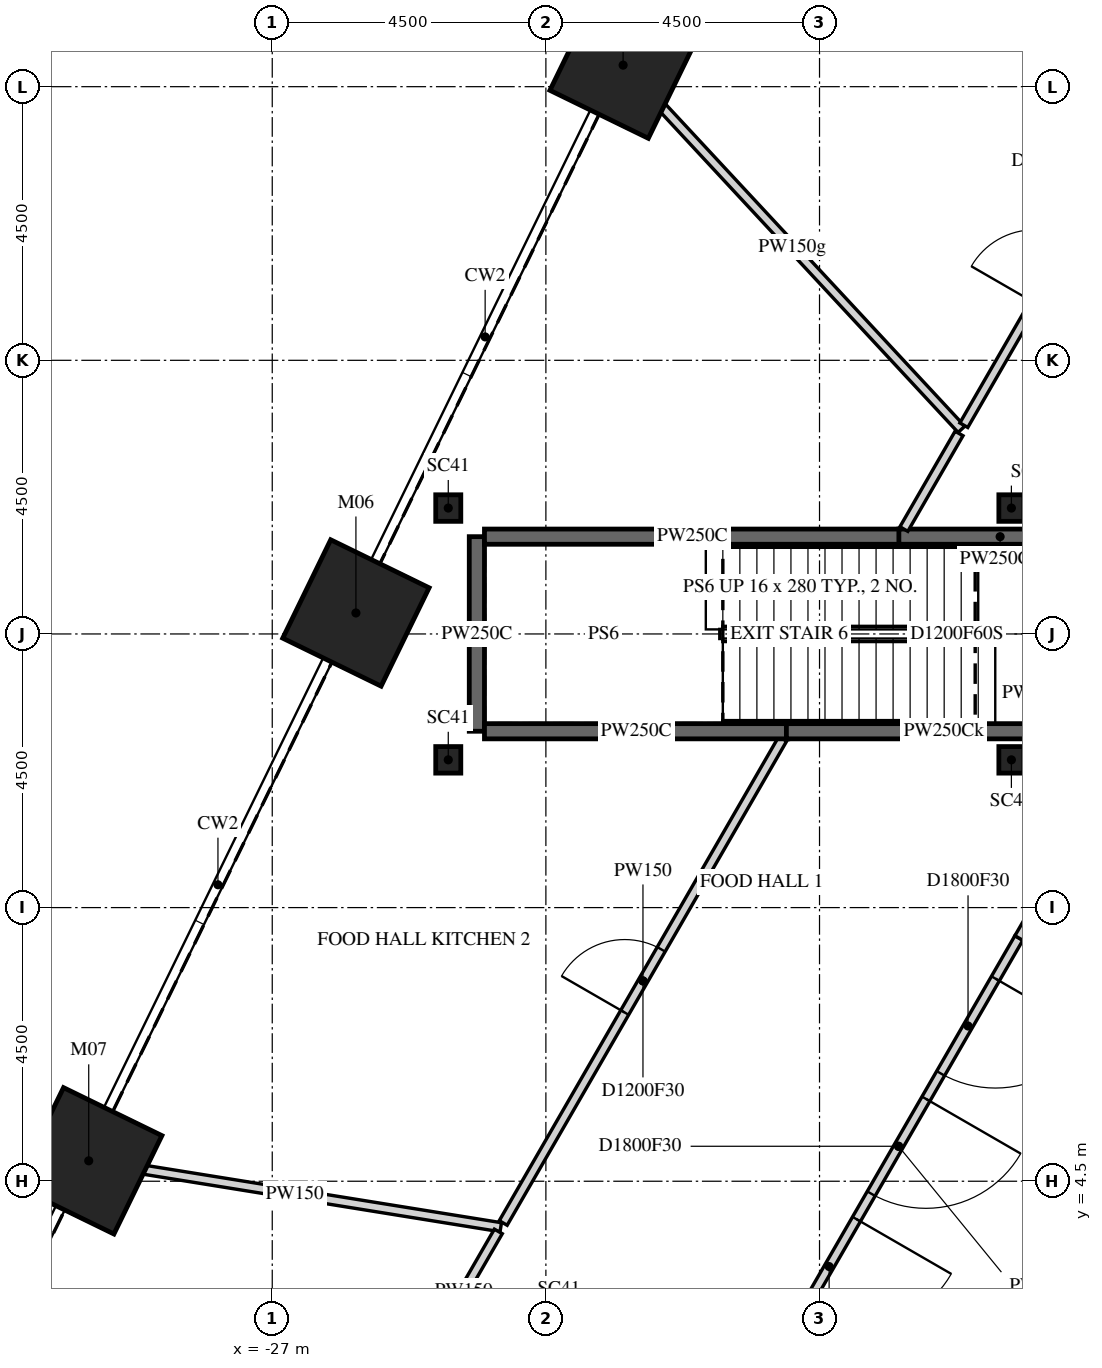
"""IFC4 building model, lengths in metres.
Left out: names, types, materials, properties, quantities, classifications, styles, units other than length and angle.
Written with IfcOpenShell. Run it as: python <this file> out.ifc"""

import sys

from ifc_helpers import new_model, si_unit, direction, frame, frame_2d, origin, origin_2d, place, context, subcontext, project, spatial, polyline, rectangle, i_section, outline, extrude, element, fill, save


model = new_model("IFC4")
c1 = context("Model", 3, precision=1e-05, world=origin(), true_north=direction((0.0, 1.0)))
c2 = subcontext(c1, "Body", "Model", "MODEL_VIEW")
j1 = project(units=[si_unit("LENGTHUNIT", "METRE"), si_unit("PLANEANGLEUNIT", "RADIAN")], contexts=[c1])
p1 = place(None, origin())
s1 = spatial("IfcSite", under=j1, at=p1, CompositionType="ELEMENT")
p2 = place(p1, origin())
s2 = spatial("IfcBuilding", under=s1, at=p2, CompositionType="ELEMENT")
p3 = place(p2, frame((0.0, 0.0, 20.5)))
s3 = spatial("IfcBuildingStorey", under=s2, at=p3, CompositionType="ELEMENT", Elevation=20.5)
for number, where, z_axis, x_axis in (
    (1, (-21.23, 22.854, -0.25), (0.0, 0.0, 1.0), (0.438, 0.899, 0.0)),
    (2, (-25.624, 13.845, -0.25), (0.0, 0.0, 1.0), (0.438, 0.899, 0.0)),
    (3, (-30.018, 4.836, -0.25), (0.0, 0.0, 1.0), (0.438, 0.899, 0.0)),
):
    element("IfcColumn", number, at=place(p3, frame(where, z_axis=z_axis, x_axis=x_axis)), inside=s3, PredefinedType="COLUMN", context=c2, shape_type="SweptSolid", body=[
        extrude(rectangle(XDim=1.8, YDim=1.8, at=origin_2d()), origin(), (0.0, 0.0, 1.0), 5.5),
    ])
for number, where, z_axis, x_axis in (
    (4, (-24.105, 11.43, -0.25), (0.0, 0.0, 1.0), (1.0, 0.0, 0.0)),
    (5, (-24.105, 15.57, -0.25), (0.0, 0.0, 1.0), (1.0, 0.0, 0.0)),
    (6, (-14.845, 15.57, -0.25), (0.0, 0.0, 1.0), (1.0, 0.0, 0.0)),
    (7, (-14.845, 11.43, -0.25), (0.0, 0.0, 1.0), (1.0, 0.0, 0.0)),
):
    element("IfcColumn", number, at=place(p3, frame(where, z_axis=z_axis, x_axis=x_axis)), inside=s3, PredefinedType="COLUMN", context=c2, shape_type="SweptSolid", body=[
        extrude(i_section(OverallWidth=0.412, OverallDepth=0.437, WebThickness=0.036, FlangeThickness=0.058, FilletRadius=0.015, at=origin_2d()), origin(), (0.0, 0.0, 1.0), 5.5),
    ])
p4 = place(p3, frame((-7.91, 13.7, -0.25), z_axis=(0.0, 0.0, 1.0), x_axis=(-0.499999880136, -0.866025472988, 0.0)))
e8 = element("IfcWall", 8, at=p4, inside=s3, PredefinedType="SHEAR", context=c2, shape_type="SweptSolid", body=[
    extrude(outline(polyline([(-0.173, -0.3), (15.993, -0.3), (15.646, 0.3), (0.173, 0.3), (-0.173, -0.3)])), origin(), (0.0, 0.0, 1.0), 5.5),
])
p5 = place(p4, frame((7.039, 0.0, 0.25)))
e9 = element("IfcOpeningElement", 9, at=p5, cuts=e8, PredefinedType="OPENING", context=c2, shape_type="SweptSolid", body=[
    extrude(rectangle(XDim=1.8, YDim=2.4, at=frame_2d((0.9, 1.2))), frame((0.0, 0.31, 0.0), z_axis=(0.0, -1.0, 0.0), x_axis=(1.0, 0.0, 0.0)), (0.0, 0.0, 1.0), 0.62),
])
p6 = place(p3, frame((-30.018, 4.836, 0.0), z_axis=(0.0, 0.0, 1.0), x_axis=(0.987261315122, -0.159107182941, 0.0)))
e10 = element("IfcWall", 10, at=p6, inside=s3, PredefinedType="PARTITIONING", context=c2, shape_type="SweptSolid", body=[
    extrude(rectangle(XDim=6.864, YDim=0.15, at=frame_2d((3.432, 0.0))), origin(), (0.0, 0.0, 1.0), 5.25),
])
p7 = place(p3, frame((-23.635, 11.9, 0.0), z_axis=(0.0, 0.0, 1.0), x_axis=(0.0, 1.0, 0.0)))
e11 = element("IfcWall", 11, at=p7, inside=s3, PredefinedType="PARTITIONING", context=c2, shape_type="SweptSolid", body=[
    extrude(rectangle(XDim=3.2, YDim=0.25, at=frame_2d((1.6, 0.0))), origin(), (0.0, 0.0, 1.0), 5.25),
])
p8 = place(p3, frame((-23.51, 15.1, 0.0), z_axis=(0.0, 0.0, 1.0), x_axis=(1.0, 0.0, 0.0)))
e12 = element("IfcWall", 12, at=p8, inside=s3, PredefinedType="PARTITIONING", context=c2, shape_type="SweptSolid", body=[
    extrude(rectangle(XDim=6.837, YDim=0.25, at=frame_2d((3.418, 0.0))), origin(), (0.0, 0.0, 1.0), 5.25),
])
p9 = place(p3, frame((-23.282, 3.675, 0.0), z_axis=(0.0, 0.0, 1.0), x_axis=(-0.49987077196, -0.866100000774, 0.0)))
e13 = element("IfcWall", 13, at=p9, inside=s3, PredefinedType="PARTITIONING", context=c2, shape_type="SweptSolid", body=[
    extrude(rectangle(XDim=2.28, YDim=0.15, at=frame_2d((1.14, 0.0))), origin(), (0.0, 0.0, 1.0), 5.25),
])
p10 = place(p3, frame((-21.23, 22.854, 0.0), z_axis=(0.0, 0.0, 1.0), x_axis=(0.680630925451, -0.732626469164, 0.0)))
e14 = element("IfcWall", 14, at=p10, inside=s3, PredefinedType="PARTITIONING", context=c2, shape_type="SweptSolid", body=[
    extrude(rectangle(XDim=8.175, YDim=0.15, at=frame_2d((4.087, 0.0))), origin(), (0.0, 0.0, 1.0), 4.488),
])
p11 = place(p3, frame((-23.202, 3.813, 0.0), z_axis=(0.0, 0.0, 1.0), x_axis=(0.500012104326, 0.866018415236, 0.0)))
e15 = element("IfcWall", 15, at=p11, inside=s3, PredefinedType="PARTITIONING", context=c2, shape_type="SweptSolid", body=[
    extrude(rectangle(XDim=9.193, YDim=0.15, at=frame_2d((4.597, 0.0))), origin(), (0.0, 0.0, 1.0), 5.25),
])
p12 = place(p11, frame((3.997, 0.0, 0.0)))
e16 = element("IfcOpeningElement", 16, at=p12, cuts=e15, PredefinedType="OPENING", context=c2, shape_type="SweptSolid", body=[
    extrude(rectangle(XDim=1.2, YDim=2.1, at=frame_2d((0.6, 1.05))), frame((0.0, 0.085, 0.0), z_axis=(0.0, -1.0, 0.0), x_axis=(1.0, 0.0, 0.0)), (0.0, 0.0, 1.0), 0.17),
])
p13 = place(p3, frame((-18.523, 11.9, 0.0), z_axis=(0.0, 0.0, 1.0), x_axis=(-1.0, 0.0, 0.0)))
e17 = element("IfcWall", 17, at=p13, inside=s3, PredefinedType="PARTITIONING", context=c2, shape_type="SweptSolid", body=[
    extrude(rectangle(XDim=4.987, YDim=0.25, at=frame_2d((2.494, 0.0))), origin(), (0.0, 0.0, 1.0), 5.25),
])
p14 = place(p3, frame((-16.695, 15.1, 0.0), z_axis=(0.0, 0.0, 1.0), x_axis=(1.0, 0.0, 0.0)))
e18 = element("IfcWall", 18, at=p14, inside=s3, PredefinedType="PARTITIONING", context=c2, shape_type="SweptSolid", body=[
    extrude(rectangle(XDim=3.33, YDim=0.25, at=frame_2d((1.665, 0.0))), origin(), (0.0, 0.0, 1.0), 4.488),
])
p15 = place(p3, frame((-15.705, 16.797, 0.0), z_axis=(0.0, 0.0, 1.0), x_axis=(-0.499943671218, -0.86605792278, 0.0)))
e19 = element("IfcWall", 19, at=p15, inside=s3, PredefinedType="PARTITIONING", context=c2, shape_type="SweptSolid", body=[
    extrude(rectangle(XDim=1.815, YDim=0.15, at=frame_2d((0.908, 0.0))), origin(), (0.0, 0.0, 1.0), 5.25),
])
p16 = place(p3, frame((-14.722, 8.5, 0.0), z_axis=(0.0, 0.0, 1.0), x_axis=(-0.500085786821, -0.865975869075, 0.0)))
e20 = element("IfcWall", 20, at=p16, inside=s3, PredefinedType="PARTITIONING", context=c2, shape_type="SweptSolid", body=[
    extrude(rectangle(XDim=7.91, YDim=0.15, at=frame_2d((3.955, 0.0))), origin(), (0.0, 0.0, 1.0), 5.25),
])
p17 = place(p16, frame((0.771, 0.0, 0.0)))
e21 = element("IfcOpeningElement", 21, at=p17, cuts=e20, PredefinedType="OPENING", context=c2, shape_type="SweptSolid", body=[
    extrude(rectangle(XDim=1.8, YDim=2.1, at=frame_2d((0.9, 1.05))), frame((0.0, 0.085, 0.0), z_axis=(0.0, -1.0, 0.0), x_axis=(1.0, 0.0, 0.0)), (0.0, 0.0, 1.0), 0.17),
])
p18 = place(p16, frame((3.055, 0.0, 0.0)))
e22 = element("IfcOpeningElement", 22, at=p18, cuts=e20, PredefinedType="OPENING", context=c2, shape_type="SweptSolid", body=[
    extrude(rectangle(XDim=1.8, YDim=2.1, at=frame_2d((0.9, 1.05))), frame((0.0, 0.085, 0.0), z_axis=(0.0, -1.0, 0.0), x_axis=(1.0, 0.0, 0.0)), (0.0, 0.0, 1.0), 0.17),
])
p19 = place(p16, frame((5.339, 0.0, 0.0)))
e23 = element("IfcOpeningElement", 23, at=p19, cuts=e20, PredefinedType="OPENING", context=c2, shape_type="SweptSolid", body=[
    extrude(rectangle(XDim=1.8, YDim=2.1, at=frame_2d((0.9, 1.05))), frame((0.0, 0.085, 0.0), z_axis=(0.0, -1.0, 0.0), x_axis=(1.0, 0.0, 0.0)), (0.0, 0.0, 1.0), 0.17),
])
p20 = place(p3, frame((-13.365, 11.9, 0.0), z_axis=(0.0, 0.0, 1.0), x_axis=(-1.0, 0.0, 0.0)))
e24 = element("IfcWall", 24, at=p20, inside=s3, PredefinedType="PARTITIONING", context=c2, shape_type="SweptSolid", body=[
    extrude(rectangle(XDim=5.18, YDim=0.25, at=frame_2d((2.59, 0.0))), origin(), (0.0, 0.0, 1.0), 4.797),
])
p21 = place(p3, frame((-12.759, 11.9, 0.0), z_axis=(0.0, 0.0, 1.0), x_axis=(-0.49999161165, -0.866030246746, 0.0)))
e25 = element("IfcWall", 25, at=p21, inside=s3, PredefinedType="PARTITIONING", context=c2, shape_type="SweptSolid", body=[
    extrude(rectangle(XDim=3.926, YDim=0.15, at=frame_2d((1.963, 0.0))), origin(), (0.0, 0.0, 1.0), 5.25),
])
p22 = place(p3, frame((-15.627, 16.933, 0.0), z_axis=(0.0, 0.0, 1.0), x_axis=(0.499909086075, 0.866077886601, 0.0)))
e26 = element("IfcWall", 26, at=p22, inside=s3, PredefinedType="PARTITIONING", context=c2, shape_type="SweptSolid", body=[
    extrude(rectangle(XDim=5.851, YDim=0.15, at=frame_2d((2.925, 0.0))), origin(), (0.0, 0.0, 1.0), 5.25),
])
p23 = place(p22, frame((2.325, 0.0, 0.0)))
e27 = element("IfcOpeningElement", 27, at=p23, cuts=e26, PredefinedType="OPENING", context=c2, shape_type="SweptSolid", body=[
    extrude(rectangle(XDim=1.2, YDim=2.1, at=frame_2d((0.6, 1.05))), frame((0.0, 0.085, 0.0), z_axis=(0.0, -1.0, 0.0), x_axis=(1.0, 0.0, 0.0)), (0.0, 0.0, 1.0), 0.17),
])
p24 = place(p12, origin())
e28 = element("IfcDoor", 28, at=p24, inside=s3, OperationType="SINGLE_SWING_LEFT", PredefinedType="DOOR", context=c2, shape_type="SweptSolid", body=[
    extrude(rectangle(XDim=1.2, YDim=2.1, at=frame_2d((0.6, 1.05))), frame((0.0, 0.025, 0.0), z_axis=(0.0, -1.0, 0.0), x_axis=(1.0, 0.0, 0.0)), (0.0, 0.0, 1.0), 0.05),
])
fill(e16, e28)
p25 = place(p17, origin())
e29 = element("IfcDoor", 29, at=p25, inside=s3, OperationType="DOUBLE_DOOR_SINGLE_SWING", PredefinedType="DOOR", context=c2, shape_type="SweptSolid", body=[
    extrude(rectangle(XDim=1.8, YDim=2.1, at=frame_2d((0.9, 1.05))), frame((0.0, 0.025, 0.0), z_axis=(0.0, -1.0, 0.0), x_axis=(1.0, 0.0, 0.0)), (0.0, 0.0, 1.0), 0.05),
])
fill(e21, e29)
p26 = place(p18, origin())
e30 = element("IfcDoor", 30, at=p26, inside=s3, OperationType="DOUBLE_DOOR_SINGLE_SWING", PredefinedType="DOOR", context=c2, shape_type="SweptSolid", body=[
    extrude(rectangle(XDim=1.8, YDim=2.1, at=frame_2d((0.9, 1.05))), frame((0.0, 0.025, 0.0), z_axis=(0.0, -1.0, 0.0), x_axis=(1.0, 0.0, 0.0)), (0.0, 0.0, 1.0), 0.05),
])
fill(e22, e30)
p27 = place(p19, origin())
e31 = element("IfcDoor", 31, at=p27, inside=s3, OperationType="DOUBLE_DOOR_SINGLE_SWING", PredefinedType="DOOR", context=c2, shape_type="SweptSolid", body=[
    extrude(rectangle(XDim=1.8, YDim=2.1, at=frame_2d((0.9, 1.05))), frame((0.0, 0.025, 0.0), z_axis=(0.0, -1.0, 0.0), x_axis=(1.0, 0.0, 0.0)), (0.0, 0.0, 1.0), 0.05),
])
fill(e23, e31)
save(model, sys.argv[1])
